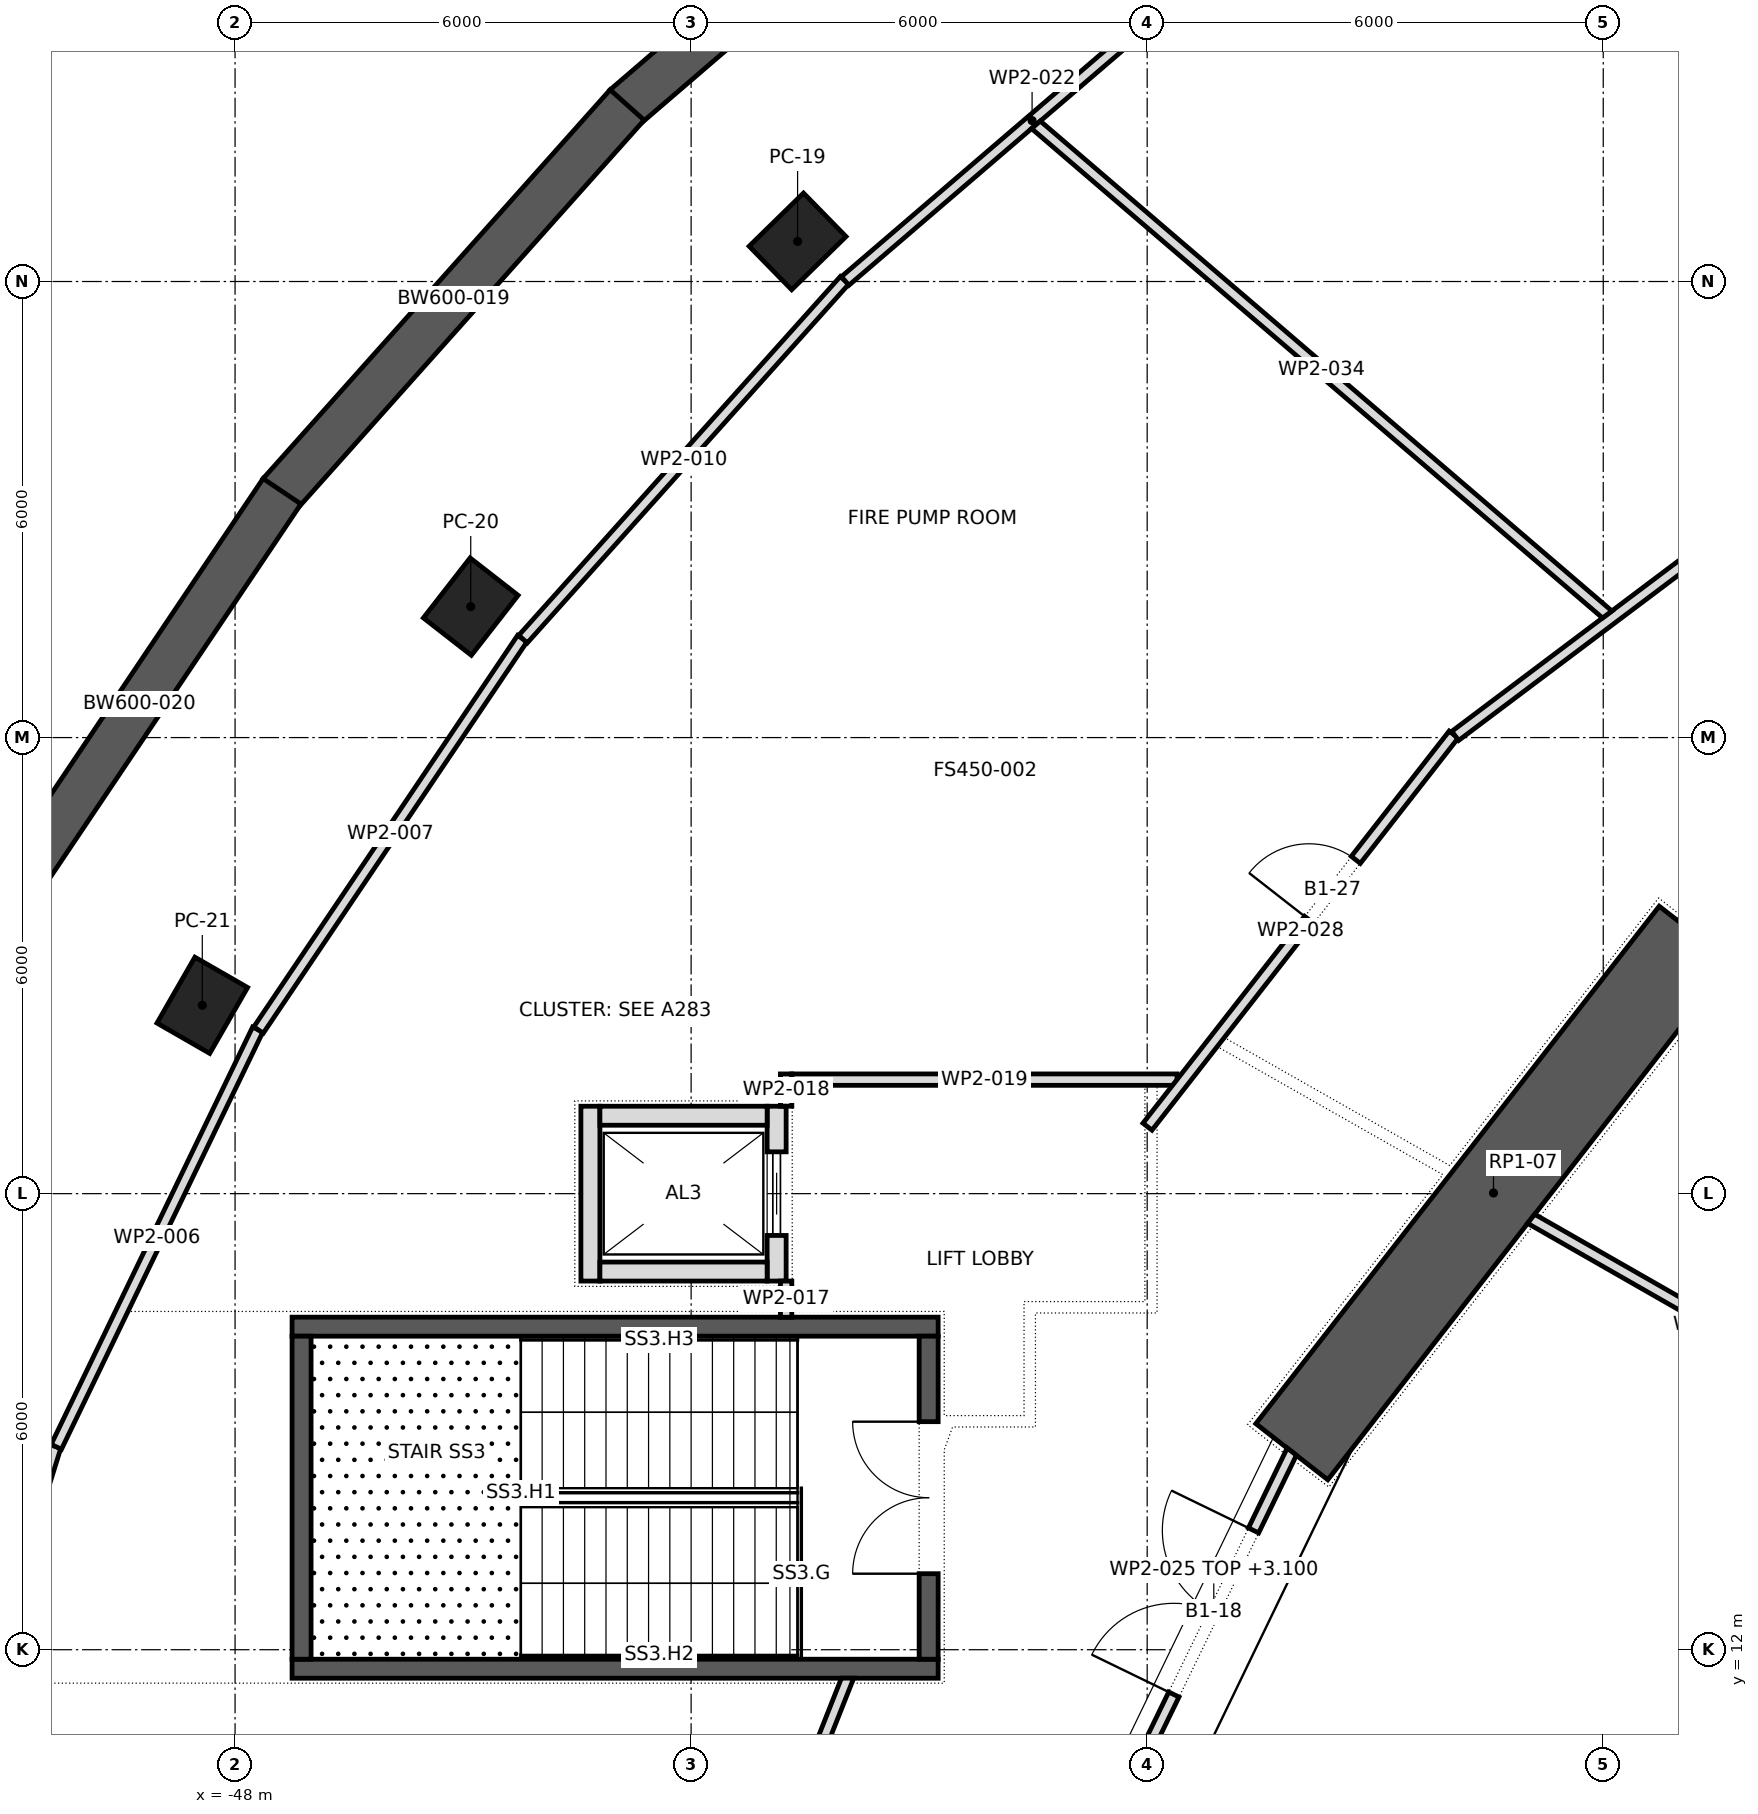
"""IFC4 building model, lengths in metres.
Left out: names, types, materials, properties, quantities, classifications, styles, units other than length and angle.
Written with IfcOpenShell. Run it as: python <this file> out.ifc"""

import sys

from ifc_helpers import new_model, si_unit, direction, frame, frame_2d, origin, origin_2d, place, context, subcontext, project, spatial, polyline, rectangle, outline, extrude, element, fill, save


model = new_model("IFC4")
c1 = context("Model", 3, precision=1e-05, world=origin(), true_north=direction((0.0, 1.0)))
c2 = subcontext(c1, "Body", "Model", "MODEL_VIEW")
j1 = project(units=[si_unit("LENGTHUNIT", "METRE"), si_unit("PLANEANGLEUNIT", "RADIAN")], contexts=[c1])
p1 = place(None, origin())
s1 = spatial("IfcSite", under=j1, at=p1, CompositionType="ELEMENT")
p2 = place(p1, origin())
s2 = spatial("IfcBuilding", under=s1, at=p2, CompositionType="ELEMENT")
p3 = place(p2, frame((0.0, 0.0, -4.0)))
s3 = spatial("IfcBuildingStorey", under=s2, at=p3, CompositionType="ELEMENT", Elevation=-4.0)
for number, where, z_axis, x_axis in (
    (1, (-40.599, 30.528, 0.0), (0.0, 0.0, 1.0), (-0.715, -0.699, 0.0)),
    (2, (-44.899, 25.723, 0.0), (0.0, 0.0, 1.0), (-0.615, -0.789, 0.0)),
    (3, (-48.431, 20.478, 0.0), (0.0, 0.0, 1.0), (-0.499, -0.867, 0.0)),
):
    element("IfcColumn", number, at=place(p3, frame(where, z_axis=z_axis, x_axis=x_axis)), inside=s3, PredefinedType="COLUMN", context=c2, shape_type="SweptSolid", body=[
        extrude(rectangle(XDim=1.0, YDim=0.8, at=origin_2d()), origin(), (0.0, 0.0, 1.0), 4.0),
    ])
p4 = place(p3, frame((-28.79, 21.412, 0.0), z_axis=(0.0, 0.0, 1.0), x_axis=(-0.614825322247, -0.788663314174, 0.0)))
e4 = element("IfcWall", 4, at=p4, inside=s3, PredefinedType="SHEAR", context=c2, shape_type="SweptSolid", body=[
    extrude(rectangle(XDim=8.632, YDim=1.2, at=frame_2d((4.316, 0.0))), origin(), (0.0, 0.0, 1.0), 4.0),
])
p5 = place(p3, frame((-37.568, 36.853, 0.0), z_axis=(0.0, 0.0, 1.0), x_axis=(-0.758319142722, -0.65188348482, 0.0)))
e5 = element("IfcWall", 5, at=p5, inside=s3, PredefinedType="SOLIDWALL", context=c2, shape_type="SweptSolid", body=[
    extrude(rectangle(XDim=6.991, YDim=0.6, at=frame_2d((3.496, 0.0))), origin(), (0.0, 0.0, 1.0), 4.0),
])
p6 = place(p3, frame((-42.842, 32.323, 0.0), z_axis=(0.0, 0.0, 1.0), x_axis=(-0.665894053378, -0.74604631872, 0.0)))
e6 = element("IfcWall", 6, at=p6, inside=s3, PredefinedType="SOLIDWALL", context=c2, shape_type="SweptSolid", body=[
    extrude(rectangle(XDim=6.856, YDim=0.6, at=frame_2d((3.428, 0.0))), origin(), (0.0, 0.0, 1.0), 4.0),
])
p7 = place(p3, frame((-47.382, 27.24, 0.0), z_axis=(0.0, 0.0, 1.0), x_axis=(-0.557518861869, -0.830164272093, 0.0)))
e7 = element("IfcWall", 7, at=p7, inside=s3, PredefinedType="SOLIDWALL", context=c2, shape_type="SweptSolid", body=[
    extrude(rectangle(XDim=6.729, YDim=0.6, at=frame_2d((3.364, 0.0))), origin(), (0.0, 0.0, 1.0), 4.0),
])
for number, where, z_axis, x_axis in (
    (8, (-47.25, 16.25, 0.0), (0.0, 0.0, 1.0), (1.0, 0.0, 0.0)),
    (9, (-47.25, 11.75, 0.0), (0.0, 0.0, 1.0), (1.0, 0.0, 0.0)),
):
    element("IfcWall", number, at=place(p3, frame(where, z_axis=z_axis, x_axis=x_axis)), inside=s3, PredefinedType="SHEAR", context=c2, shape_type="SweptSolid", body=[
        extrude(rectangle(XDim=8.5, YDim=0.25, at=frame_2d((4.25, 0.0))), origin(), (0.0, 0.0, 1.0), 3.55),
    ])
p8 = place(p3, frame((-47.125, 11.875, 0.0), z_axis=(0.0, 0.0, 1.0), x_axis=(0.0, 1.0, 0.0)))
e10 = element("IfcWall", 10, at=p8, inside=s3, PredefinedType="SHEAR", context=c2, shape_type="SweptSolid", body=[
    extrude(rectangle(XDim=4.25, YDim=0.25, at=frame_2d((2.125, 0.0))), origin(), (0.0, 0.0, 1.0), 3.55),
])
p9 = place(p3, frame((-38.875, 11.875, 0.0), z_axis=(0.0, 0.0, 1.0), x_axis=(0.0, 1.0, 0.0)))
e11 = element("IfcWall", 11, at=p9, inside=s3, PredefinedType="SHEAR", context=c2, shape_type="SweptSolid", body=[
    extrude(rectangle(XDim=4.25, YDim=0.25, at=frame_2d((2.125, 0.0))), origin(), (0.0, 0.0, 1.0), 3.55),
])
p10 = place(p9, frame((1.125, 0.0, 0.0)))
e12 = element("IfcOpeningElement", 12, at=p10, cuts=e11, PredefinedType="OPENING", context=c2, shape_type="SweptSolid", body=[
    extrude(rectangle(XDim=2.0, YDim=2.1, at=frame_2d((1.0, 1.05))), frame((0.0, 0.137, 0.0), z_axis=(0.0, -1.0, 0.0), x_axis=(1.0, 0.0, 0.0)), (0.0, 0.0, 1.0), 0.274),
])
p11 = place(p3, frame((-43.325, 16.85, 0.0), z_axis=(0.0, 0.0, 1.0), x_axis=(0.0, 1.0, 0.0)))
e13 = element("IfcWall", 13, at=p11, inside=s3, PredefinedType="PARTITIONING", context=c2, shape_type="SweptSolid", body=[
    extrude(rectangle(XDim=2.3, YDim=0.25, at=frame_2d((1.15, 0.0))), origin(), (0.0, 0.0, 1.0), 3.55),
])
p12 = place(p3, frame((-40.875, 16.85, 0.0), z_axis=(0.0, 0.0, 1.0), x_axis=(0.0, 1.0, 0.0)))
e14 = element("IfcWall", 14, at=p12, inside=s3, PredefinedType="PARTITIONING", context=c2, shape_type="SweptSolid", body=[
    extrude(rectangle(XDim=2.3, YDim=0.25, at=frame_2d((1.15, 0.0))), origin(), (0.0, 0.0, 1.0), 3.55),
])
p13 = place(p12, frame((0.6, 0.0, 0.0)))
e15 = element("IfcOpeningElement", 15, at=p13, cuts=e14, PredefinedType="OPENING", context=c2, shape_type="SweptSolid", body=[
    extrude(rectangle(XDim=1.1, YDim=2.1, at=frame_2d((0.55, 1.05))), frame((0.0, 0.137, 0.0), z_axis=(0.0, -1.0, 0.0), x_axis=(1.0, 0.0, 0.0)), (0.0, 0.0, 1.0), 0.274),
])
for number, where, z_axis, x_axis in (
    (16, (-43.2, 19.025, 0.0), (0.0, 0.0, 1.0), (1.0, 0.0, 0.0)),
    (17, (-43.2, 16.975, 0.0), (0.0, 0.0, 1.0), (1.0, 0.0, 0.0)),
):
    element("IfcWall", number, at=place(p3, frame(where, z_axis=z_axis, x_axis=x_axis)), inside=s3, PredefinedType="PARTITIONING", context=c2, shape_type="SweptSolid", body=[
        extrude(rectangle(XDim=2.2, YDim=0.25, at=frame_2d((1.1, 0.0))), origin(), (0.0, 0.0, 1.0), 3.55),
    ])
p14 = place(p3, frame((-52.154, 8.934, 0.0), z_axis=(0.0, 0.0, 1.0), x_axis=(0.297713123711, 0.954655380737, 0.0)))
e18 = element("IfcWall", 18, at=p14, inside=s3, PredefinedType="PARTITIONING", context=c2, shape_type="SweptSolid", body=[
    extrude(rectangle(XDim=6.013, YDim=0.15, at=frame_2d((3.006, 0.0))), origin(), (0.0, 0.0, 1.0), 3.55),
])
p15 = place(p3, frame((-50.352, 14.669, 0.0), z_axis=(0.0, 0.0, 1.0), x_axis=(0.434723306584, 0.900564071409, 0.0)))
e19 = element("IfcWall", 19, at=p15, inside=s3, PredefinedType="PARTITIONING", context=c2, shape_type="SweptSolid", body=[
    extrude(rectangle(XDim=6.096, YDim=0.15, at=frame_2d((3.048, 0.0))), origin(), (0.0, 0.0, 1.0), 3.55),
])
p16 = place(p3, frame((-47.691, 20.153, 0.0), z_axis=(0.0, 0.0, 1.0), x_axis=(0.558812320082, 0.829294152231, 0.0)))
e20 = element("IfcWall", 20, at=p16, inside=s3, PredefinedType="PARTITIONING", context=c2, shape_type="SweptSolid", body=[
    extrude(rectangle(XDim=6.21, YDim=0.15, at=frame_2d((3.105, 0.0))), origin(), (0.0, 0.0, 1.0), 3.55),
])
p17 = place(p3, frame((-44.211, 25.295, 0.0), z_axis=(0.0, 0.0, 1.0), x_axis=(0.6673947824, 0.744704105283, 0.0)))
e21 = element("IfcWall", 21, at=p17, inside=s3, PredefinedType="PARTITIONING", context=c2, shape_type="SweptSolid", body=[
    extrude(rectangle(XDim=6.338, YDim=0.15, at=frame_2d((3.169, 0.0))), origin(), (0.0, 0.0, 1.0), 3.55),
])
p18 = place(p3, frame((-41.699, 7.183, 0.0), z_axis=(0.0, 0.0, 1.0), x_axis=(0.367872650967, 0.929876181365, 0.0)))
e22 = element("IfcWall", 22, at=p18, inside=s3, PredefinedType="PARTITIONING", context=c2, shape_type="SweptSolid", body=[
    extrude(outline(polyline([(0.0, -0.075), (4.807, -0.075), (4.748, 0.075), (0.0, 0.075), (0.0, -0.075)])), origin(), (0.0, 0.0, 1.0), 3.55),
])
p19 = place(p3, frame((-40.75, 16.374, 0.0), z_axis=(0.0, 0.0, 1.0), x_axis=(0.0, 1.0, 0.0)))
e23 = element("IfcWall", 23, at=p19, inside=s3, PredefinedType="PARTITIONING", context=c2, shape_type="SweptSolid", body=[
    extrude(rectangle(XDim=0.476, YDim=0.15, at=frame_2d((0.238, 0.0))), origin(), (0.0, 0.0, 1.0), 3.55),
])
p20 = place(p3, frame((-40.75, 19.15, 0.0), z_axis=(0.0, 0.0, 1.0), x_axis=(0.0, 1.0, 0.0)))
e24 = element("IfcWall", 24, at=p20, inside=s3, PredefinedType="PARTITIONING", context=c2, shape_type="SweptSolid", body=[
    extrude(rectangle(XDim=0.425, YDim=0.15, at=frame_2d((0.212, 0.0))), origin(), (0.0, 0.0, 1.0), 3.55),
])
p21 = place(p3, frame((-40.675, 19.5, 0.0), z_axis=(0.0, 0.0, 1.0), x_axis=(1.0, 0.0, 0.0)))
e25 = element("IfcWall", 25, at=p21, inside=s3, PredefinedType="PARTITIONING", context=c2, shape_type="SweptSolid", body=[
    extrude(rectangle(XDim=5.068, YDim=0.15, at=frame_2d((2.534, 0.0))), origin(), (0.0, 0.0, 1.0), 3.55),
])
p22 = place(p3, frame((-39.973, 30.007, 0.0), z_axis=(0.0, 0.0, 1.0), x_axis=(0.759038455419, 0.651045791934, 0.0)))
e26 = element("IfcWall", 26, at=p22, inside=s3, PredefinedType="PARTITIONING", context=c2, shape_type="SweptSolid", body=[
    extrude(rectangle(XDim=6.479, YDim=0.15, at=frame_2d((3.24, 0.0))), origin(), (0.0, 0.0, 1.0), 3.55),
])
p23 = place(p3, frame((-36.15, 10.38, 0.0), z_axis=(0.0, 0.0, 1.0), x_axis=(0.436936398764, 0.899492403212, 0.0)))
e27 = element("IfcWall", 27, at=p23, inside=s3, PredefinedType="PARTITIONING", context=c2, shape_type="SweptSolid", body=[
    extrude(outline(polyline([(0.017, -0.075), (4.682, -0.075), (4.714, 0.075), (-0.017, 0.075), (0.017, -0.075)])), origin(), (0.0, 0.0, 1.0), 3.1),
])
p24 = place(p23, frame((1.146, 0.0, 0.0)))
e28 = element("IfcOpeningElement", 28, at=p24, cuts=e27, PredefinedType="OPENING", context=c2, shape_type="SweptSolid", body=[
    extrude(rectangle(XDim=2.4, YDim=2.1, at=frame_2d((1.2, 1.05))), frame((0.0, 0.087, 0.0), z_axis=(0.0, -1.0, 0.0), x_axis=(1.0, 0.0, 0.0)), (0.0, 0.0, 1.0), 0.174),
])
p25 = place(p3, frame((-35.996, 18.881, 0.0), z_axis=(0.0, 0.0, 1.0), x_axis=(0.615457986142, 0.788169694478, 0.0)))
e29 = element("IfcWall", 29, at=p25, inside=s3, PredefinedType="PARTITIONING", context=c2, shape_type="SweptSolid", body=[
    extrude(rectangle(XDim=6.545, YDim=0.15, at=frame_2d((3.272, 0.0))), origin(), (0.0, 0.0, 1.0), 3.55),
])
p26 = place(p25, frame((3.454, 0.0, 0.0)))
e30 = element("IfcOpeningElement", 30, at=p26, cuts=e29, PredefinedType="OPENING", context=c2, shape_type="SweptSolid", body=[
    extrude(rectangle(XDim=1.0, YDim=2.1, at=frame_2d((0.5, 1.05))), frame((0.0, 0.087, 0.0), z_axis=(0.0, -1.0, 0.0), x_axis=(1.0, 0.0, 0.0)), (0.0, 0.0, 1.0), 0.174),
])
p27 = place(p3, frame((-31.947, 24.022, 0.0), z_axis=(0.0, 0.0, 1.0), x_axis=(0.799194171191, 0.601072937949, 0.0)))
e31 = element("IfcWall", 31, at=p27, inside=s3, PredefinedType="PARTITIONING", context=c2, shape_type="SweptSolid", body=[
    extrude(rectangle(XDim=10.444, YDim=0.15, at=frame_2d((5.222, 0.0))), origin(), (0.0, 0.0, 1.0), 3.55),
])
p28 = place(p3, frame((-29.947, 25.619, 0.0), z_axis=(0.0, 0.0, 1.0), x_axis=(-0.759265306208, 0.650781218836, 0.0)))
e32 = element("IfcWall", 32, at=p28, inside=s3, PredefinedType="PARTITIONING", context=c2, shape_type="SweptSolid", body=[
    extrude(outline(polyline([(-0.017, -0.075), (9.888, -0.075), (9.911, 0.075), (0.017, 0.075), (-0.017, -0.075)])), origin(), (0.0, 0.0, 1.0), 3.55),
])
p29 = place(p3, frame((-26.074, 14.882, 0.0), z_axis=(0.0, 0.0, 1.0), x_axis=(-0.868133416031, 0.496330909746, 0.0)))
e33 = element("IfcWall", 33, at=p29, inside=s3, PredefinedType="PARTITIONING", context=c2, shape_type="SweptSolid", body=[
    extrude(outline(polyline([(0.0, -0.075), (5.604, -0.075), (5.626, 0.075), (0.0, 0.075), (0.0, -0.075)])), origin(), (0.0, 0.0, 1.0), 3.55),
])
p30 = place(p13, origin())
e34 = element("IfcDoor", 34, at=p30, inside=s3, OperationType="SLIDING_TO_LEFT", PredefinedType="DOOR", context=c2, shape_type="SweptSolid", body=[
    extrude(rectangle(XDim=1.1, YDim=2.1, at=frame_2d((0.55, 1.05))), frame((0.0, 0.025, 0.0), z_axis=(0.0, -1.0, 0.0), x_axis=(1.0, 0.0, 0.0)), (0.0, 0.0, 1.0), 0.05),
])
fill(e15, e34)
p31 = place(p10, origin())
e35 = element("IfcDoor", 35, at=p31, inside=s3, OperationType="DOUBLE_DOOR_SINGLE_SWING", PredefinedType="DOOR", context=c2, shape_type="SweptSolid", body=[
    extrude(rectangle(XDim=2.0, YDim=2.1, at=frame_2d((1.0, 1.05))), frame((0.0, 0.025, 0.0), z_axis=(0.0, -1.0, 0.0), x_axis=(1.0, 0.0, 0.0)), (0.0, 0.0, 1.0), 0.05),
])
fill(e12, e35)
p32 = place(p24, origin())
e36 = element("IfcDoor", 36, at=p32, inside=s3, OperationType="DOUBLE_DOOR_SINGLE_SWING", PredefinedType="DOOR", context=c2, shape_type="SweptSolid", body=[
    extrude(rectangle(XDim=2.4, YDim=2.1, at=frame_2d((1.2, 1.05))), frame((0.0, 0.025, 0.0), z_axis=(0.0, -1.0, 0.0), x_axis=(1.0, 0.0, 0.0)), (0.0, 0.0, 1.0), 0.05),
])
fill(e28, e36)
p33 = place(p26, origin())
e37 = element("IfcDoor", 37, at=p33, inside=s3, OperationType="SINGLE_SWING_RIGHT", PredefinedType="DOOR", context=c2, shape_type="SweptSolid", body=[
    extrude(rectangle(XDim=1.0, YDim=2.1, at=frame_2d((0.5, 1.05))), frame((0.0, 0.025, 0.0), z_axis=(0.0, -1.0, 0.0), x_axis=(1.0, 0.0, 0.0)), (0.0, 0.0, 1.0), 0.05),
])
fill(e30, e37)
save(model, sys.argv[1])
